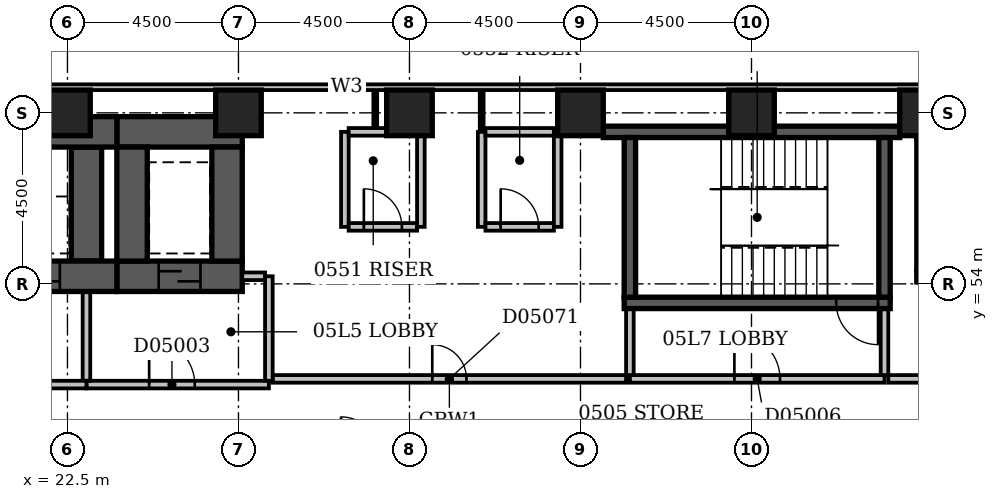
"""IFC4 building model, lengths in metres.
Left out: names, types, materials, properties, quantities, classifications, styles, units other than length and angle.
Written with IfcOpenShell. Run it as: python <this file> out.ifc"""

import sys

from ifc_helpers import new_model, si_unit, direction, frame, frame_2d, origin, origin_2d, place, context, subcontext, project, spatial, rectangle, extrude, element, fill, save


model = new_model("IFC4")
c1 = context("Model", 3, precision=1e-05, world=origin(), true_north=direction((0.0, 1.0)))
c2 = subcontext(c1, "Body", "Model", "MODEL_VIEW")
j1 = project(units=[si_unit("LENGTHUNIT", "METRE"), si_unit("PLANEANGLEUNIT", "RADIAN")], contexts=[c1])
p1 = place(None, origin())
s1 = spatial("IfcSite", under=j1, at=p1, CompositionType="ELEMENT")
p2 = place(p1, origin())
s2 = spatial("IfcBuilding", under=s1, at=p2, CompositionType="ELEMENT")
p3 = place(p2, frame((0.0, 0.0, 29.0)))
s3 = spatial("IfcBuildingStorey", under=s2, at=p3, CompositionType="ELEMENT", Elevation=29.0)
p4 = place(p3, frame((7.35, 54.2, -0.3), z_axis=(0.0, 0.0, 1.0), x_axis=(1.0, 0.0, 0.0)))
e1 = element("IfcWall", 1, at=p4, inside=s3, PredefinedType="SHEAR", context=c2, shape_type="SweptSolid", body=[
    extrude(rectangle(XDim=16.45, YDim=0.8, at=frame_2d((8.225, 0.0))), origin(), (0.0, 0.0, 1.0), 3.6),
])
p5 = place(p4, frame((1.35, 0.0, 0.3)))
e2 = element("IfcOpeningElement", 2, at=p5, cuts=e1, PredefinedType="OPENING", context=c2, shape_type="SweptSolid", body=[
    extrude(rectangle(XDim=1.1, YDim=2.1, at=frame_2d((0.55, 1.05))), frame((0.0, 0.412, 0.0), z_axis=(0.0, -1.0, 0.0), x_axis=(1.0, 0.0, 0.0)), (0.0, 0.0, 1.0), 0.824),
])
p6 = place(p4, frame((3.85, 0.0, 0.3)))
e3 = element("IfcOpeningElement", 3, at=p6, cuts=e1, PredefinedType="OPENING", context=c2, shape_type="SweptSolid", body=[
    extrude(rectangle(XDim=1.1, YDim=2.1, at=frame_2d((0.55, 1.05))), frame((0.0, 0.412, 0.0), z_axis=(0.0, -1.0, 0.0), x_axis=(1.0, 0.0, 0.0)), (0.0, 0.0, 1.0), 0.824),
])
p7 = place(p4, frame((6.35, 0.0, 0.3)))
e4 = element("IfcOpeningElement", 4, at=p7, cuts=e1, PredefinedType="OPENING", context=c2, shape_type="SweptSolid", body=[
    extrude(rectangle(XDim=1.1, YDim=2.1, at=frame_2d((0.55, 1.05))), frame((0.0, 0.412, 0.0), z_axis=(0.0, -1.0, 0.0), x_axis=(1.0, 0.0, 0.0)), (0.0, 0.0, 1.0), 0.824),
])
p8 = place(p4, frame((8.85, 0.0, 0.3)))
e5 = element("IfcOpeningElement", 5, at=p8, cuts=e1, PredefinedType="OPENING", context=c2, shape_type="SweptSolid", body=[
    extrude(rectangle(XDim=1.1, YDim=2.1, at=frame_2d((0.55, 1.05))), frame((0.0, 0.412, 0.0), z_axis=(0.0, -1.0, 0.0), x_axis=(1.0, 0.0, 0.0)), (0.0, 0.0, 1.0), 0.824),
])
p9 = place(p4, frame((11.35, 0.0, 0.3)))
e6 = element("IfcOpeningElement", 6, at=p9, cuts=e1, PredefinedType="OPENING", context=c2, shape_type="SweptSolid", body=[
    extrude(rectangle(XDim=1.1, YDim=2.1, at=frame_2d((0.55, 1.05))), frame((0.0, 0.412, 0.0), z_axis=(0.0, -1.0, 0.0), x_axis=(1.0, 0.0, 0.0)), (0.0, 0.0, 1.0), 0.824),
])
p10 = place(p4, frame((13.85, 0.0, 0.3)))
e7 = element("IfcOpeningElement", 7, at=p10, cuts=e1, PredefinedType="OPENING", context=c2, shape_type="SweptSolid", body=[
    extrude(rectangle(XDim=1.1, YDim=2.1, at=frame_2d((0.55, 1.05))), frame((0.0, 0.412, 0.0), z_axis=(0.0, -1.0, 0.0), x_axis=(1.0, 0.0, 0.0)), (0.0, 0.0, 1.0), 0.824),
])
p11 = place(p3, frame((7.35, 58.0, -0.3), z_axis=(0.0, 0.0, 1.0), x_axis=(1.0, 0.0, 0.0)))
e8 = element("IfcWall", 8, at=p11, inside=s3, PredefinedType="SHEAR", context=c2, shape_type="SweptSolid", body=[
    extrude(rectangle(XDim=16.45, YDim=0.8, at=frame_2d((8.225, 0.0))), origin(), (0.0, 0.0, 1.0), 3.6),
])
p12 = place(p3, frame((23.0, 54.6, -0.3), z_axis=(0.0, 0.0, 1.0), x_axis=(0.0, 1.0, 0.0)))
e9 = element("IfcWall", 9, at=p12, inside=s3, PredefinedType="SHEAR", context=c2, shape_type="SweptSolid", body=[
    extrude(rectangle(XDim=3.0, YDim=0.8, at=frame_2d((1.5, 0.0))), origin(), (0.0, 0.0, 1.0), 3.6),
])
p13 = place(p3, frame((23.8, 54.2, -0.3), z_axis=(0.0, 0.0, 1.0), x_axis=(1.0, 0.0, 0.0)))
e10 = element("IfcWall", 10, at=p13, inside=s3, PredefinedType="SHEAR", context=c2, shape_type="SweptSolid", body=[
    extrude(rectangle(XDim=3.3, YDim=0.8, at=frame_2d((1.65, 0.0))), origin(), (0.0, 0.0, 1.0), 3.6),
])
p14 = place(p13, frame((1.1, 0.0, 0.3)))
e11 = element("IfcOpeningElement", 11, at=p14, cuts=e10, PredefinedType="OPENING", context=c2, shape_type="SweptSolid", body=[
    extrude(rectangle(XDim=1.1, YDim=2.1, at=frame_2d((0.55, 1.05))), frame((0.0, 0.412, 0.0), z_axis=(0.0, -1.0, 0.0), x_axis=(1.0, 0.0, 0.0)), (0.0, 0.0, 1.0), 0.824),
])
p15 = place(p3, frame((23.8, 58.0, -0.3), z_axis=(0.0, 0.0, 1.0), x_axis=(1.0, 0.0, 0.0)))
e12 = element("IfcWall", 12, at=p15, inside=s3, PredefinedType="SHEAR", context=c2, shape_type="SweptSolid", body=[
    extrude(rectangle(XDim=3.3, YDim=0.8, at=frame_2d((1.65, 0.0))), origin(), (0.0, 0.0, 1.0), 3.6),
])
for number, where, z_axis, x_axis in (
    (13, (24.2, 54.6, -0.3), (0.0, 0.0, 1.0), (0.0, 1.0, 0.0)),
    (14, (26.7, 54.6, -0.3), (0.0, 0.0, 1.0), (0.0, 1.0, 0.0)),
):
    element("IfcWall", number, at=place(p3, frame(where, z_axis=z_axis, x_axis=x_axis)), inside=s3, PredefinedType="SHEAR", context=c2, shape_type="SweptSolid", body=[
        extrude(rectangle(XDim=3.0, YDim=0.8, at=frame_2d((1.5, 0.0))), origin(), (0.0, 0.0, 1.0), 3.6),
    ])
p16 = place(p3, frame((36.6, 58.0, -0.3), z_axis=(0.0, 0.0, 1.0), x_axis=(1.0, 0.0, 0.0)))
e15 = element("IfcWall", 15, at=p16, inside=s3, PredefinedType="SHEAR", context=c2, shape_type="SweptSolid", body=[
    extrude(rectangle(XDim=7.8, YDim=0.3, at=frame_2d((3.9, 0.0))), origin(), (0.0, 0.0, 1.0), 3.6),
])
p17 = place(p3, frame((37.15, 53.5, -0.3), z_axis=(0.0, 0.0, 1.0), x_axis=(1.0, 0.0, 0.0)))
e16 = element("IfcWall", 16, at=p17, inside=s3, PredefinedType="SHEAR", context=c2, shape_type="SweptSolid", body=[
    extrude(rectangle(XDim=7.0, YDim=0.3, at=frame_2d((3.5, 0.0))), origin(), (0.0, 0.0, 1.0), 3.6),
])
p18 = place(p17, frame((5.58, 0.0, 0.3)))
e17 = element("IfcOpeningElement", 17, at=p18, cuts=e16, PredefinedType="OPENING", context=c2, shape_type="SweptSolid", body=[
    extrude(rectangle(XDim=1.1, YDim=2.1, at=frame_2d((0.55, 1.05))), frame((0.0, 0.162, 0.0), z_axis=(0.0, -1.0, 0.0), x_axis=(1.0, 0.0, 0.0)), (0.0, 0.0, 1.0), 0.324),
])
for number, where, z_axis, x_axis in (
    (18, (37.3, 53.65, -0.3), (0.0, 0.0, 1.0), (0.0, 1.0, 0.0)),
    (19, (44.0, 53.65, -0.3), (0.0, 0.0, 1.0), (0.0, 1.0, 0.0)),
):
    element("IfcWall", number, at=place(p3, frame(where, z_axis=z_axis, x_axis=x_axis)), inside=s3, PredefinedType="SHEAR", context=c2, shape_type="SweptSolid", body=[
        extrude(rectangle(XDim=4.2, YDim=0.3, at=frame_2d((2.1, 0.0))), origin(), (0.0, 0.0, 1.0), 3.6),
    ])
p19 = place(p3, frame((44.85, 54.2, -0.3), z_axis=(0.0, 0.0, 1.0), x_axis=(1.0, 0.0, 0.0)))
e20 = element("IfcWall", 20, at=p19, inside=s3, PredefinedType="SHEAR", context=c2, shape_type="SweptSolid", body=[
    extrude(rectangle(XDim=2.15, YDim=0.3, at=frame_2d((1.075, 0.0))), origin(), (0.0, 0.0, 1.0), 3.6),
])
p20 = place(p19, frame((0.65, 0.0, 0.3)))
e21 = element("IfcOpeningElement", 21, at=p20, cuts=e20, PredefinedType="OPENING", context=c2, shape_type="SweptSolid", body=[
    extrude(rectangle(XDim=1.0, YDim=2.1, at=frame_2d((0.5, 1.05))), frame((0.0, 0.162, 0.0), z_axis=(0.0, -1.0, 0.0), x_axis=(1.0, 0.0, 0.0)), (0.0, 0.0, 1.0), 0.324),
])
p21 = place(p3, frame((44.85, 58.0, -0.3), z_axis=(0.0, 0.0, 1.0), x_axis=(1.0, 0.0, 0.0)))
e22 = element("IfcWall", 22, at=p21, inside=s3, PredefinedType="SHEAR", context=c2, shape_type="SweptSolid", body=[
    extrude(rectangle(XDim=2.15, YDim=0.3, at=frame_2d((1.075, 0.0))), origin(), (0.0, 0.0, 1.0), 3.6),
])
p22 = place(p3, frame((45.0, 54.35, -0.3), z_axis=(0.0, 0.0, 1.0), x_axis=(0.0, 1.0, 0.0)))
e23 = element("IfcWall", 23, at=p22, inside=s3, PredefinedType="SHEAR", context=c2, shape_type="SweptSolid", body=[
    extrude(rectangle(XDim=3.5, YDim=0.3, at=frame_2d((1.75, 0.0))), origin(), (0.0, 0.0, 1.0), 3.6),
])
for number, where, z_axis, x_axis in (
    (24, (22.5, 58.5, -0.3), (0.0, 0.0, 1.0), (1.0, 0.0, 0.0)),
    (25, (27.0, 58.5, -0.3), (0.0, 0.0, 1.0), (1.0, 0.0, 0.0)),
    (26, (31.5, 58.5, -0.3), (0.0, 0.0, 1.0), (1.0, 0.0, 0.0)),
    (27, (36.0, 58.5, -0.3), (0.0, 0.0, 1.0), (1.0, 0.0, 0.0)),
    (28, (40.5, 58.5, -0.3), (0.0, 0.0, 1.0), (1.0, 0.0, 0.0)),
    (29, (45.0, 58.5, -0.3), (0.0, 0.0, 1.0), (1.0, 0.0, 0.0)),
):
    element("IfcColumn", number, at=place(p3, frame(where, z_axis=z_axis, x_axis=x_axis)), inside=s3, PredefinedType="COLUMN", context=c2, shape_type="SweptSolid", body=[
        extrude(rectangle(XDim=1.2, YDim=1.2, at=origin_2d()), origin(), (0.0, 0.0, 1.0), 3.6),
    ])
p23 = place(p3, frame((68.1, 59.175, 0.0), z_axis=(0.0, 0.0, 1.0), x_axis=(-1.0, 0.0, 0.0)))
e30 = element("IfcWall", 30, at=p23, inside=s3, PredefinedType="STANDARD", context=c2, shape_type="SweptSolid", body=[
    extrude(rectangle(XDim=68.85, YDim=0.15, at=frame_2d((34.425, 0.0))), origin(), (0.0, 0.0, 1.0), 2.7),
])
p24 = place(p23, frame((1.65, 0.0, 0.6)))
e31 = element("IfcOpeningElement", 31, at=p24, cuts=e30, PredefinedType="OPENING", context=c2, shape_type="SweptSolid", body=[
    extrude(rectangle(XDim=2.4, YDim=1.8, at=frame_2d((1.2, 0.9))), frame((0.0, 0.087, 0.0), z_axis=(0.0, -1.0, 0.0), x_axis=(1.0, 0.0, 0.0)), (0.0, 0.0, 1.0), 0.174),
])
p25 = place(p23, frame((6.15, 0.0, 0.6)))
e32 = element("IfcOpeningElement", 32, at=p25, cuts=e30, PredefinedType="OPENING", context=c2, shape_type="SweptSolid", body=[
    extrude(rectangle(XDim=2.4, YDim=1.8, at=frame_2d((1.2, 0.9))), frame((0.0, 0.087, 0.0), z_axis=(0.0, -1.0, 0.0), x_axis=(1.0, 0.0, 0.0)), (0.0, 0.0, 1.0), 0.174),
])
p26 = place(p23, frame((37.798, 0.0, 0.6)))
e33 = element("IfcOpeningElement", 33, at=p26, cuts=e30, PredefinedType="OPENING", context=c2, shape_type="SweptSolid", body=[
    extrude(rectangle(XDim=0.9, YDim=1.8, at=frame_2d((0.45, 0.9))), frame((0.0, 0.087, 0.0), z_axis=(0.0, -1.0, 0.0), x_axis=(1.0, 0.0, 0.0)), (0.0, 0.0, 1.0), 0.174),
])
p27 = place(p3, frame((8.0, 51.35, 0.0), z_axis=(0.0, 0.0, 1.0), x_axis=(1.0, 0.0, 0.0)))
e34 = element("IfcWall", 34, at=p27, inside=s3, PredefinedType="PARTITIONING", context=c2, shape_type="SweptSolid", body=[
    extrude(rectangle(XDim=15.0, YDim=0.2, at=frame_2d((7.5, 0.0))), origin(), (0.0, 0.0, 1.0), 3.3),
])
p28 = place(p27, frame((3.4, 0.0, 0.0)))
e35 = element("IfcOpeningElement", 35, at=p28, cuts=e34, PredefinedType="OPENING", context=c2, shape_type="SweptSolid", body=[
    extrude(rectangle(XDim=1.2, YDim=2.1, at=frame_2d((0.6, 1.05))), frame((0.0, 0.112, 0.0), z_axis=(0.0, -1.0, 0.0), x_axis=(1.0, 0.0, 0.0)), (0.0, 0.0, 1.0), 0.224),
])
p29 = place(p27, frame((9.4, 0.0, 0.0)))
e36 = element("IfcOpeningElement", 36, at=p29, cuts=e34, PredefinedType="OPENING", context=c2, shape_type="SweptSolid", body=[
    extrude(rectangle(XDim=1.2, YDim=2.1, at=frame_2d((0.6, 1.05))), frame((0.0, 0.112, 0.0), z_axis=(0.0, -1.0, 0.0), x_axis=(1.0, 0.0, 0.0)), (0.0, 0.0, 1.0), 0.224),
])
p30 = place(p3, frame((23.0, 51.45, 0.0), z_axis=(0.0, 0.0, 1.0), x_axis=(0.0, 1.0, 0.0)))
e37 = element("IfcWall", 37, at=p30, inside=s3, PredefinedType="PARTITIONING", context=c2, shape_type="SweptSolid", body=[
    extrude(rectangle(XDim=2.33, YDim=0.2, at=frame_2d((1.165, 0.0))), origin(), (0.0, 0.0, 1.0), 3.3),
])
p31 = place(p3, frame((23.0, 51.35, 0.0), z_axis=(0.0, 0.0, 1.0), x_axis=(1.0, 0.0, 0.0)))
e38 = element("IfcWall", 38, at=p31, inside=s3, PredefinedType="PARTITIONING", context=c2, shape_type="SweptSolid", body=[
    extrude(rectangle(XDim=4.8, YDim=0.2, at=frame_2d((2.4, 0.0))), origin(), (0.0, 0.0, 1.0), 3.3),
])
p32 = place(p31, frame((1.65, 0.0, 0.0)))
e39 = element("IfcOpeningElement", 39, at=p32, cuts=e38, PredefinedType="OPENING", context=c2, shape_type="SweptSolid", body=[
    extrude(rectangle(XDim=1.2, YDim=2.1, at=frame_2d((0.6, 1.05))), frame((0.0, 0.112, 0.0), z_axis=(0.0, -1.0, 0.0), x_axis=(1.0, 0.0, 0.0)), (0.0, 0.0, 1.0), 0.224),
])
p33 = place(p3, frame((27.8, 51.45, 0.0), z_axis=(0.0, 0.0, 1.0), x_axis=(0.0, 1.0, 0.0)))
e40 = element("IfcWall", 40, at=p33, inside=s3, PredefinedType="PARTITIONING", context=c2, shape_type="SweptSolid", body=[
    extrude(rectangle(XDim=2.75, YDim=0.2, at=frame_2d((1.375, 0.0))), origin(), (0.0, 0.0, 1.0), 3.3),
])
p34 = place(p3, frame((27.1, 54.2, 0.0), z_axis=(0.0, 0.0, 1.0), x_axis=(1.0, 0.0, 0.0)))
e41 = element("IfcWall", 41, at=p34, inside=s3, PredefinedType="PARTITIONING", context=c2, shape_type="SweptSolid", body=[
    extrude(rectangle(XDim=0.6, YDim=0.2, at=frame_2d((0.3, 0.0))), origin(), (0.0, 0.0, 1.0), 3.3),
])
p35 = place(p3, frame((37.3, 51.5, 0.0), z_axis=(0.0, 0.0, 1.0), x_axis=(1.0, 0.0, 0.0)))
e42 = element("IfcWall", 42, at=p35, inside=s3, PredefinedType="PARTITIONING", context=c2, shape_type="SweptSolid", body=[
    extrude(rectangle(XDim=6.7, YDim=0.2, at=frame_2d((3.35, 0.0))), origin(), (0.0, 0.0, 1.0), 3.3),
])
p36 = place(p35, frame((2.75, 0.0, 0.0)))
e43 = element("IfcOpeningElement", 43, at=p36, cuts=e42, PredefinedType="OPENING", context=c2, shape_type="SweptSolid", body=[
    extrude(rectangle(XDim=1.2, YDim=2.1, at=frame_2d((0.6, 1.05))), frame((0.0, 0.112, 0.0), z_axis=(0.0, -1.0, 0.0), x_axis=(1.0, 0.0, 0.0)), (0.0, 0.0, 1.0), 0.224),
])
for number, where, z_axis, x_axis in (
    (44, (44.0, 51.6, 0.0), (0.0, 0.0, 1.0), (0.0, 1.0, 0.0)),
    (45, (37.3, 51.6, 0.0), (0.0, 0.0, 1.0), (0.0, 1.0, 0.0)),
):
    element("IfcWall", number, at=place(p3, frame(where, z_axis=z_axis, x_axis=x_axis)), inside=s3, PredefinedType="PARTITIONING", context=c2, shape_type="SweptSolid", body=[
        extrude(rectangle(XDim=1.73, YDim=0.2, at=frame_2d((0.865, 0.0))), origin(), (0.0, 0.0, 1.0), 3.3),
    ])
p37 = place(p3, frame((27.9, 51.5, 0.0), z_axis=(0.0, 0.0, 1.0), x_axis=(1.0, 0.0, 0.0)))
e46 = element("IfcWall", 46, at=p37, inside=s3, PredefinedType="PARTITIONING", context=c2, shape_type="SweptSolid", body=[
    extrude(rectangle(XDim=9.3, YDim=0.2, at=frame_2d((4.65, 0.0))), origin(), (0.0, 0.0, 1.0), 3.3),
])
p38 = place(p37, frame((4.2, 0.0, 0.0)))
e47 = element("IfcOpeningElement", 47, at=p38, cuts=e46, PredefinedType="OPENING", context=c2, shape_type="SweptSolid", body=[
    extrude(rectangle(XDim=0.9, YDim=2.1, at=frame_2d((0.45, 1.05))), frame((0.0, 0.112, 0.0), z_axis=(0.0, -1.0, 0.0), x_axis=(1.0, 0.0, 0.0)), (0.0, 0.0, 1.0), 0.224),
])
p39 = place(p3, frame((44.1, 51.5, 0.0), z_axis=(0.0, 0.0, 1.0), x_axis=(1.0, 0.0, 0.0)))
e48 = element("IfcWall", 48, at=p39, inside=s3, PredefinedType="PARTITIONING", context=c2, shape_type="SweptSolid", body=[
    extrude(rectangle(XDim=2.8, YDim=0.2, at=frame_2d((1.4, 0.0))), origin(), (0.0, 0.0, 1.0), 3.3),
])
p40 = place(p39, frame((0.95, 0.0, 0.0)))
e49 = element("IfcOpeningElement", 49, at=p40, cuts=e48, PredefinedType="OPENING", context=c2, shape_type="SweptSolid", body=[
    extrude(rectangle(XDim=0.9, YDim=2.1, at=frame_2d((0.45, 1.05))), frame((0.0, 0.112, 0.0), z_axis=(0.0, -1.0, 0.0), x_axis=(1.0, 0.0, 0.0)), (0.0, 0.0, 1.0), 0.224),
])
p41 = place(p3, frame((29.8, 55.5, 0.0), z_axis=(0.0, 0.0, 1.0), x_axis=(0.0, 1.0, 0.0)))
e50 = element("IfcWall", 50, at=p41, inside=s3, PredefinedType="PARTITIONING", context=c2, shape_type="SweptSolid", body=[
    extrude(rectangle(XDim=2.5, YDim=0.2, at=frame_2d((1.25, 0.0))), origin(), (0.0, 0.0, 1.0), 3.3),
])
p42 = place(p3, frame((29.9, 55.5, 0.0), z_axis=(0.0, 0.0, 1.0), x_axis=(1.0, 0.0, 0.0)))
e51 = element("IfcWall", 51, at=p42, inside=s3, PredefinedType="PARTITIONING", context=c2, shape_type="SweptSolid", body=[
    extrude(rectangle(XDim=1.8, YDim=0.2, at=frame_2d((0.9, 0.0))), origin(), (0.0, 0.0, 1.0), 3.3),
])
p43 = place(p42, frame((0.4, 0.0, 0.0)))
e52 = element("IfcOpeningElement", 52, at=p43, cuts=e51, PredefinedType="OPENING", context=c2, shape_type="SweptSolid", body=[
    extrude(rectangle(XDim=1.0, YDim=2.1, at=frame_2d((0.5, 1.05))), frame((0.0, 0.112, 0.0), z_axis=(0.0, -1.0, 0.0), x_axis=(1.0, 0.0, 0.0)), (0.0, 0.0, 1.0), 0.224),
])
for number, where, z_axis, x_axis in (
    (53, (31.8, 55.5, 0.0), (0.0, 0.0, 1.0), (0.0, 1.0, 0.0)),
    (54, (33.4, 55.5, 0.0), (0.0, 0.0, 1.0), (0.0, 1.0, 0.0)),
):
    element("IfcWall", number, at=place(p3, frame(where, z_axis=z_axis, x_axis=x_axis)), inside=s3, PredefinedType="PARTITIONING", context=c2, shape_type="SweptSolid", body=[
        extrude(rectangle(XDim=2.5, YDim=0.2, at=frame_2d((1.25, 0.0))), origin(), (0.0, 0.0, 1.0), 3.3),
    ])
p44 = place(p3, frame((33.5, 55.5, 0.0), z_axis=(0.0, 0.0, 1.0), x_axis=(1.0, 0.0, 0.0)))
e55 = element("IfcWall", 55, at=p44, inside=s3, PredefinedType="PARTITIONING", context=c2, shape_type="SweptSolid", body=[
    extrude(rectangle(XDim=1.8, YDim=0.2, at=frame_2d((0.9, 0.0))), origin(), (0.0, 0.0, 1.0), 3.3),
])
p45 = place(p44, frame((0.4, 0.0, 0.0)))
e56 = element("IfcOpeningElement", 56, at=p45, cuts=e55, PredefinedType="OPENING", context=c2, shape_type="SweptSolid", body=[
    extrude(rectangle(XDim=1.0, YDim=2.1, at=frame_2d((0.5, 1.05))), frame((0.0, 0.112, 0.0), z_axis=(0.0, -1.0, 0.0), x_axis=(1.0, 0.0, 0.0)), (0.0, 0.0, 1.0), 0.224),
])
p46 = place(p3, frame((35.4, 55.5, 0.0), z_axis=(0.0, 0.0, 1.0), x_axis=(0.0, 1.0, 0.0)))
e57 = element("IfcWall", 57, at=p46, inside=s3, PredefinedType="PARTITIONING", context=c2, shape_type="SweptSolid", body=[
    extrude(rectangle(XDim=2.5, YDim=0.2, at=frame_2d((1.25, 0.0))), origin(), (0.0, 0.0, 1.0), 2.4),
])
p47 = place(p3, frame((29.9, 58.0, 0.0), z_axis=(0.0, 0.0, 1.0), x_axis=(1.0, 0.0, 0.0)))
e58 = element("IfcWall", 58, at=p47, inside=s3, PredefinedType="PARTITIONING", context=c2, shape_type="SweptSolid", body=[
    extrude(rectangle(XDim=1.8, YDim=0.2, at=frame_2d((0.9, 0.0))), origin(), (0.0, 0.0, 1.0), 3.3),
])
p48 = place(p3, frame((33.4, 58.0, 0.0), z_axis=(0.0, 0.0, 1.0), x_axis=(0.0, 1.0, 0.0)))
e59 = element("IfcWall", 59, at=p48, inside=s3, PredefinedType="PARTITIONING", context=c2, shape_type="SweptSolid", body=[
    extrude(rectangle(XDim=1.1, YDim=0.1, at=frame_2d((0.55, 0.0))), origin(), (0.0, 0.0, 1.0), 3.3),
])
p49 = place(p3, frame((33.5, 58.0, 0.0), z_axis=(0.0, 0.0, 1.0), x_axis=(1.0, 0.0, 0.0)))
e60 = element("IfcWall", 60, at=p49, inside=s3, PredefinedType="PARTITIONING", context=c2, shape_type="SweptSolid", body=[
    extrude(rectangle(XDim=1.8, YDim=0.2, at=frame_2d((0.9, 0.0))), origin(), (0.0, 0.0, 1.0), 3.3),
])
p50 = place(p3, frame((30.6, 58.1, 0.0), z_axis=(0.0, 0.0, 1.0), x_axis=(0.0, 1.0, 0.0)))
e61 = element("IfcWall", 61, at=p50, inside=s3, PredefinedType="PARTITIONING", context=c2, shape_type="SweptSolid", body=[
    extrude(rectangle(XDim=1.0, YDim=0.1, at=frame_2d((0.5, 0.0))), origin(), (0.0, 0.0, 1.0), 3.3),
])
p51 = place(p26, origin())
e62 = element("IfcWindow", 62, at=p51, inside=s3, PartitioningType="SINGLE_PANEL", PredefinedType="WINDOW", context=c2, shape_type="SweptSolid", body=[
    extrude(rectangle(XDim=0.9, YDim=1.8, at=frame_2d((0.45, 0.9))), frame((0.0, 0.03, 0.0), z_axis=(0.0, -1.0, 0.0), x_axis=(1.0, 0.0, 0.0)), (0.0, 0.0, 1.0), 0.06),
])
fill(e33, e62)
p52 = place(p32, origin())
e63 = element("IfcDoor", 63, at=p52, inside=s3, OperationType="SINGLE_SWING_LEFT", PredefinedType="DOOR", context=c2, shape_type="SweptSolid", body=[
    extrude(rectangle(XDim=1.2, YDim=2.1, at=frame_2d((0.6, 1.05))), frame((0.0, 0.025, 0.0), z_axis=(0.0, -1.0, 0.0), x_axis=(1.0, 0.0, 0.0)), (0.0, 0.0, 1.0), 0.05),
])
fill(e39, e63)
p53 = place(p14, origin())
e64 = element("IfcDoor", 64, at=p53, inside=s3, OperationType="SLIDING_TO_LEFT", PredefinedType="DOOR", context=c2, shape_type="SweptSolid", body=[
    extrude(rectangle(XDim=1.1, YDim=2.1, at=frame_2d((0.55, 1.05))), frame((0.0, 0.025, 0.0), z_axis=(0.0, -1.0, 0.0), x_axis=(1.0, 0.0, 0.0)), (0.0, 0.0, 1.0), 0.05),
])
fill(e11, e64)
p54 = place(p10, origin())
e65 = element("IfcDoor", 65, at=p54, inside=s3, OperationType="SLIDING_TO_LEFT", PredefinedType="DOOR", context=c2, shape_type="SweptSolid", body=[
    extrude(rectangle(XDim=1.1, YDim=2.1, at=frame_2d((0.55, 1.05))), frame((0.0, 0.025, 0.0), z_axis=(0.0, -1.0, 0.0), x_axis=(1.0, 0.0, 0.0)), (0.0, 0.0, 1.0), 0.05),
])
fill(e7, e65)
p55 = place(p36, origin())
e66 = element("IfcDoor", 66, at=p55, inside=s3, OperationType="SINGLE_SWING_LEFT", PredefinedType="DOOR", context=c2, shape_type="SweptSolid", body=[
    extrude(rectangle(XDim=1.2, YDim=2.1, at=frame_2d((0.6, 1.05))), frame((0.0, 0.025, 0.0), z_axis=(0.0, -1.0, 0.0), x_axis=(1.0, 0.0, 0.0)), (0.0, 0.0, 1.0), 0.05),
])
fill(e43, e66)
p56 = place(p18, origin())
e67 = element("IfcDoor", 67, at=p56, inside=s3, OperationType="SINGLE_SWING_RIGHT", PredefinedType="DOOR", context=c2, shape_type="SweptSolid", body=[
    extrude(rectangle(XDim=1.1, YDim=2.1, at=frame_2d((0.55, 1.05))), frame((0.0, 0.025, 0.0), z_axis=(0.0, -1.0, 0.0), x_axis=(1.0, 0.0, 0.0)), (0.0, 0.0, 1.0), 0.05),
])
fill(e17, e67)
p57 = place(p38, origin())
e68 = element("IfcDoor", 68, at=p57, inside=s3, OperationType="SINGLE_SWING_LEFT", PredefinedType="DOOR", context=c2, shape_type="SweptSolid", body=[
    extrude(rectangle(XDim=0.9, YDim=2.1, at=frame_2d((0.45, 1.05))), frame((0.0, 0.025, 0.0), z_axis=(0.0, -1.0, 0.0), x_axis=(1.0, 0.0, 0.0)), (0.0, 0.0, 1.0), 0.05),
])
fill(e47, e68)
p58 = place(p43, origin())
e69 = element("IfcDoor", 69, at=p58, inside=s3, OperationType="SINGLE_SWING_LEFT", PredefinedType="DOOR", context=c2, shape_type="SweptSolid", body=[
    extrude(rectangle(XDim=1.0, YDim=2.1, at=frame_2d((0.5, 1.05))), frame((0.0, 0.025, 0.0), z_axis=(0.0, -1.0, 0.0), x_axis=(1.0, 0.0, 0.0)), (0.0, 0.0, 1.0), 0.05),
])
fill(e52, e69)
p59 = place(p45, origin())
e70 = element("IfcDoor", 70, at=p59, inside=s3, OperationType="SINGLE_SWING_LEFT", PredefinedType="DOOR", context=c2, shape_type="SweptSolid", body=[
    extrude(rectangle(XDim=1.0, YDim=2.1, at=frame_2d((0.5, 1.05))), frame((0.0, 0.025, 0.0), z_axis=(0.0, -1.0, 0.0), x_axis=(1.0, 0.0, 0.0)), (0.0, 0.0, 1.0), 0.05),
])
fill(e56, e70)
save(model, sys.argv[1])
